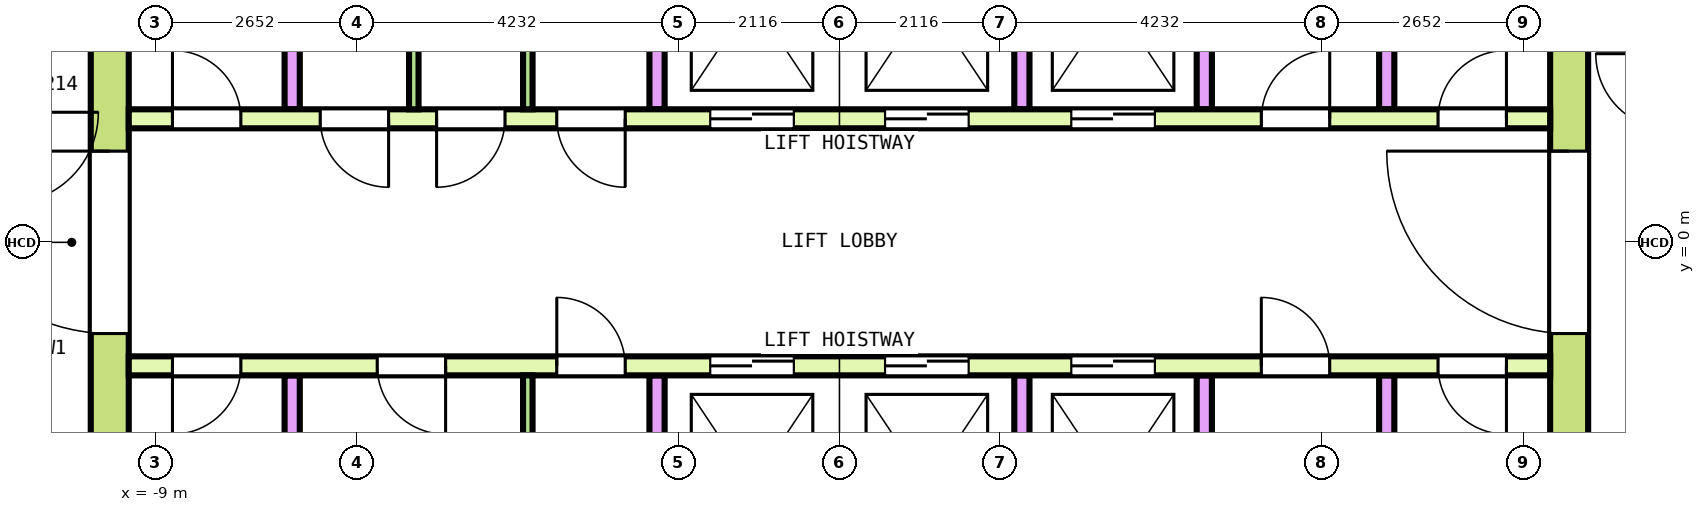
"""IFC4 building model, lengths in metres.
Left out: names, types, materials, properties, quantities, classifications, styles, units other than length and angle.
Written with IfcOpenShell. Run it as: python <this file> out.ifc"""

import sys

from ifc_helpers import new_model, si_unit, direction, frame, frame_2d, origin, place, context, subcontext, project, spatial, rectangle, extrude, element, fill, save


model = new_model("IFC4")
c1 = context("Model", 3, precision=1e-05, world=origin(), true_north=direction((0.0, 1.0)))
c2 = subcontext(c1, "Body", "Model", "MODEL_VIEW")
j1 = project(units=[si_unit("LENGTHUNIT", "METRE"), si_unit("PLANEANGLEUNIT", "RADIAN")], contexts=[c1])
p1 = place(None, origin())
s1 = spatial("IfcSite", under=j1, at=p1, CompositionType="ELEMENT")
p2 = place(p1, origin())
s2 = spatial("IfcBuilding", under=s1, at=p2, CompositionType="ELEMENT")
p3 = place(p2, frame((0.0, 0.0, 287.0)))
s3 = spatial("IfcBuildingStorey", under=s2, at=p3, CompositionType="ELEMENT", Elevation=287.0)
p4 = place(p3, frame((-9.6, -7.85, 0.0), z_axis=(0.0, 0.0, 1.0), x_axis=(0.0, 1.0, 0.0)))
e1 = element("IfcWall", 1, at=p4, inside=s3, PredefinedType="SHEAR", context=c2, shape_type="SweptSolid", body=[
    extrude(rectangle(XDim=15.7, YDim=0.5, at=frame_2d((7.85, 0.0))), origin(), (0.0, 0.0, 1.0), 3.7),
])
p5 = place(p4, frame((6.65, 0.0, 0.0)))
e2 = element("IfcOpeningElement", 2, at=p5, cuts=e1, PredefinedType="OPENING", context=c2, shape_type="SweptSolid", body=[
    extrude(rectangle(XDim=2.4, YDim=2.1, at=frame_2d((1.2, 1.05))), frame((0.0, 0.26, 0.0), z_axis=(0.0, -1.0, 0.0), x_axis=(1.0, 0.0, 0.0)), (0.0, 0.0, 1.0), 0.52),
])
p6 = place(p4, frame((13.55, 0.0, 0.0)))
e3 = element("IfcOpeningElement", 3, at=p6, cuts=e1, PredefinedType="OPENING", context=c2, shape_type="SweptSolid", body=[
    extrude(rectangle(XDim=1.2, YDim=2.1, at=frame_2d((0.6, 1.05))), frame((0.0, 0.26, 0.0), z_axis=(0.0, -1.0, 0.0), x_axis=(1.0, 0.0, 0.0)), (0.0, 0.0, 1.0), 0.52),
])
p7 = place(p4, frame((0.95, 0.0, 0.0)))
e4 = element("IfcOpeningElement", 4, at=p7, cuts=e1, PredefinedType="OPENING", context=c2, shape_type="SweptSolid", body=[
    extrude(rectangle(XDim=1.2, YDim=2.1, at=frame_2d((0.6, 1.05))), frame((0.0, 0.26, 0.0), z_axis=(0.0, -1.0, 0.0), x_axis=(1.0, 0.0, 0.0)), (0.0, 0.0, 1.0), 0.52),
])
p8 = place(p3, frame((9.6, -7.85, 0.0), z_axis=(0.0, 0.0, 1.0), x_axis=(0.0, 1.0, 0.0)))
e5 = element("IfcWall", 5, at=p8, inside=s3, PredefinedType="SHEAR", context=c2, shape_type="SweptSolid", body=[
    extrude(rectangle(XDim=15.7, YDim=0.5, at=frame_2d((7.85, 0.0))), origin(), (0.0, 0.0, 1.0), 3.7),
])
p9 = place(p8, frame((6.65, 0.0, 0.0)))
e6 = element("IfcOpeningElement", 6, at=p9, cuts=e5, PredefinedType="OPENING", context=c2, shape_type="SweptSolid", body=[
    extrude(rectangle(XDim=2.4, YDim=2.1, at=frame_2d((1.2, 1.05))), frame((0.0, 0.26, 0.0), z_axis=(0.0, -1.0, 0.0), x_axis=(1.0, 0.0, 0.0)), (0.0, 0.0, 1.0), 0.52),
])
p10 = place(p8, frame((13.55, 0.0, 0.0)))
e7 = element("IfcOpeningElement", 7, at=p10, cuts=e5, PredefinedType="OPENING", context=c2, shape_type="SweptSolid", body=[
    extrude(rectangle(XDim=1.2, YDim=2.1, at=frame_2d((0.6, 1.05))), frame((0.0, 0.26, 0.0), z_axis=(0.0, -1.0, 0.0), x_axis=(1.0, 0.0, 0.0)), (0.0, 0.0, 1.0), 0.52),
])
p11 = place(p8, frame((1.05, 0.0, 0.0)))
e8 = element("IfcOpeningElement", 8, at=p11, cuts=e5, PredefinedType="OPENING", context=c2, shape_type="SweptSolid", body=[
    extrude(rectangle(XDim=1.0, YDim=2.1, at=frame_2d((0.5, 1.05))), frame((0.0, 0.26, 0.0), z_axis=(0.0, -1.0, 0.0), x_axis=(1.0, 0.0, 0.0)), (0.0, 0.0, 1.0), 0.52),
])
p12 = place(p3, frame((-9.35, 1.625, 0.0), z_axis=(0.0, 0.0, 1.0), x_axis=(1.0, 0.0, 0.0)))
e9 = element("IfcWall", 9, at=p12, inside=s3, PredefinedType="SOLIDWALL", context=c2, shape_type="SweptSolid", body=[
    extrude(rectangle(XDim=18.7, YDim=0.25, at=frame_2d((9.35, 0.0))), origin(), (0.0, 0.0, 1.0), 3.7),
])
p13 = place(p12, frame((7.65, 0.0, 0.0)))
e10 = element("IfcOpeningElement", 10, at=p13, cuts=e9, PredefinedType="OPENING", context=c2, shape_type="SweptSolid", body=[
    extrude(rectangle(XDim=1.1, YDim=2.1, at=frame_2d((0.55, 1.05))), frame((0.0, 0.135, 0.0), z_axis=(0.0, -1.0, 0.0), x_axis=(1.0, 0.0, 0.0)), (0.0, 0.0, 1.0), 0.27),
])
p14 = place(p12, frame((9.95, 0.0, 0.0)))
e11 = element("IfcOpeningElement", 11, at=p14, cuts=e9, PredefinedType="OPENING", context=c2, shape_type="SweptSolid", body=[
    extrude(rectangle(XDim=1.1, YDim=2.1, at=frame_2d((0.55, 1.05))), frame((0.0, 0.135, 0.0), z_axis=(0.0, -1.0, 0.0), x_axis=(1.0, 0.0, 0.0)), (0.0, 0.0, 1.0), 0.27),
])
p15 = place(p12, frame((12.4, 0.0, 0.0)))
e12 = element("IfcOpeningElement", 12, at=p15, cuts=e9, PredefinedType="OPENING", context=c2, shape_type="SweptSolid", body=[
    extrude(rectangle(XDim=1.1, YDim=2.1, at=frame_2d((0.55, 1.05))), frame((0.0, 0.135, 0.0), z_axis=(0.0, -1.0, 0.0), x_axis=(1.0, 0.0, 0.0)), (0.0, 0.0, 1.0), 0.27),
])
p16 = place(p12, frame((0.575, 0.0, 0.0)))
e13 = element("IfcOpeningElement", 13, at=p16, cuts=e9, PredefinedType="OPENING", context=c2, shape_type="SweptSolid", body=[
    extrude(rectangle(XDim=0.9, YDim=2.1, at=frame_2d((0.45, 1.05))), frame((0.0, 0.135, 0.0), z_axis=(0.0, -1.0, 0.0), x_axis=(1.0, 0.0, 0.0)), (0.0, 0.0, 1.0), 0.27),
])
p17 = place(p12, frame((2.519, 0.0, 0.0)))
e14 = element("IfcOpeningElement", 14, at=p17, cuts=e9, PredefinedType="OPENING", context=c2, shape_type="SweptSolid", body=[
    extrude(rectangle(XDim=0.9, YDim=2.1, at=frame_2d((0.45, 1.05))), frame((0.0, 0.135, 0.0), z_axis=(0.0, -1.0, 0.0), x_axis=(1.0, 0.0, 0.0)), (0.0, 0.0, 1.0), 0.27),
])
p18 = place(p12, frame((4.05, 0.0, 0.0)))
e15 = element("IfcOpeningElement", 15, at=p18, cuts=e9, PredefinedType="OPENING", context=c2, shape_type="SweptSolid", body=[
    extrude(rectangle(XDim=0.9, YDim=2.1, at=frame_2d((0.45, 1.05))), frame((0.0, 0.135, 0.0), z_axis=(0.0, -1.0, 0.0), x_axis=(1.0, 0.0, 0.0)), (0.0, 0.0, 1.0), 0.27),
])
p19 = place(p12, frame((5.631, 0.0, 0.0)))
e16 = element("IfcOpeningElement", 16, at=p19, cuts=e9, PredefinedType="OPENING", context=c2, shape_type="SweptSolid", body=[
    extrude(rectangle(XDim=0.9, YDim=2.1, at=frame_2d((0.45, 1.05))), frame((0.0, 0.135, 0.0), z_axis=(0.0, -1.0, 0.0), x_axis=(1.0, 0.0, 0.0)), (0.0, 0.0, 1.0), 0.27),
])
p20 = place(p12, frame((14.9, 0.0, 0.0)))
e17 = element("IfcOpeningElement", 17, at=p20, cuts=e9, PredefinedType="OPENING", context=c2, shape_type="SweptSolid", body=[
    extrude(rectangle(XDim=0.9, YDim=2.1, at=frame_2d((0.45, 1.05))), frame((0.0, 0.135, 0.0), z_axis=(0.0, -1.0, 0.0), x_axis=(1.0, 0.0, 0.0)), (0.0, 0.0, 1.0), 0.27),
])
p21 = place(p12, frame((17.225, 0.0, 0.0)))
e18 = element("IfcOpeningElement", 18, at=p21, cuts=e9, PredefinedType="OPENING", context=c2, shape_type="SweptSolid", body=[
    extrude(rectangle(XDim=0.9, YDim=2.1, at=frame_2d((0.45, 1.05))), frame((0.0, 0.135, 0.0), z_axis=(0.0, -1.0, 0.0), x_axis=(1.0, 0.0, 0.0)), (0.0, 0.0, 1.0), 0.27),
])
for number, where, z_axis, x_axis in (
    (19, (-7.2, 1.75, 0.0), (0.0, 0.0, 1.0), (0.0, 1.0, 0.0)),
    (20, (-2.4, 1.75, 0.0), (0.0, 0.0, 1.0), (0.0, 1.0, 0.0)),
    (21, (2.4, 1.75, 0.0), (0.0, 0.0, 1.0), (0.0, 1.0, 0.0)),
    (22, (4.8, 1.75, 0.0), (0.0, 0.0, 1.0), (0.0, 1.0, 0.0)),
    (23, (7.2, 1.75, 0.0), (0.0, 0.0, 1.0), (0.0, 1.0, 0.0)),
):
    element("IfcWall", number, at=place(p3, frame(where, z_axis=z_axis, x_axis=x_axis)), inside=s3, PredefinedType="SOLIDWALL", context=c2, shape_type="SweptSolid", body=[
        extrude(rectangle(XDim=2.9, YDim=0.2, at=frame_2d((1.45, 0.0))), origin(), (0.0, 0.0, 1.0), 3.7),
    ])
p22 = place(p3, frame((-9.35, -1.625, 0.0), z_axis=(0.0, 0.0, 1.0), x_axis=(1.0, 0.0, 0.0)))
e24 = element("IfcWall", 24, at=p22, inside=s3, PredefinedType="SOLIDWALL", context=c2, shape_type="SweptSolid", body=[
    extrude(rectangle(XDim=18.7, YDim=0.25, at=frame_2d((9.35, 0.0))), origin(), (0.0, 0.0, 1.0), 3.7),
])
p23 = place(p22, frame((7.65, 0.0, 0.0)))
e25 = element("IfcOpeningElement", 25, at=p23, cuts=e24, PredefinedType="OPENING", context=c2, shape_type="SweptSolid", body=[
    extrude(rectangle(XDim=1.1, YDim=2.1, at=frame_2d((0.55, 1.05))), frame((0.0, 0.135, 0.0), z_axis=(0.0, -1.0, 0.0), x_axis=(1.0, 0.0, 0.0)), (0.0, 0.0, 1.0), 0.27),
])
p24 = place(p22, frame((9.95, 0.0, 0.0)))
e26 = element("IfcOpeningElement", 26, at=p24, cuts=e24, PredefinedType="OPENING", context=c2, shape_type="SweptSolid", body=[
    extrude(rectangle(XDim=1.1, YDim=2.1, at=frame_2d((0.55, 1.05))), frame((0.0, 0.135, 0.0), z_axis=(0.0, -1.0, 0.0), x_axis=(1.0, 0.0, 0.0)), (0.0, 0.0, 1.0), 0.27),
])
p25 = place(p22, frame((12.4, 0.0, 0.0)))
e27 = element("IfcOpeningElement", 27, at=p25, cuts=e24, PredefinedType="OPENING", context=c2, shape_type="SweptSolid", body=[
    extrude(rectangle(XDim=1.1, YDim=2.1, at=frame_2d((0.55, 1.05))), frame((0.0, 0.135, 0.0), z_axis=(0.0, -1.0, 0.0), x_axis=(1.0, 0.0, 0.0)), (0.0, 0.0, 1.0), 0.27),
])
p26 = place(p22, frame((0.575, 0.0, 0.0)))
e28 = element("IfcOpeningElement", 28, at=p26, cuts=e24, PredefinedType="OPENING", context=c2, shape_type="SweptSolid", body=[
    extrude(rectangle(XDim=0.9, YDim=2.1, at=frame_2d((0.45, 1.05))), frame((0.0, 0.135, 0.0), z_axis=(0.0, -1.0, 0.0), x_axis=(1.0, 0.0, 0.0)), (0.0, 0.0, 1.0), 0.27),
])
p27 = place(p22, frame((3.269, 0.0, 0.0)))
e29 = element("IfcOpeningElement", 29, at=p27, cuts=e24, PredefinedType="OPENING", context=c2, shape_type="SweptSolid", body=[
    extrude(rectangle(XDim=0.9, YDim=2.1, at=frame_2d((0.45, 1.05))), frame((0.0, 0.135, 0.0), z_axis=(0.0, -1.0, 0.0), x_axis=(1.0, 0.0, 0.0)), (0.0, 0.0, 1.0), 0.27),
])
p28 = place(p22, frame((5.631, 0.0, 0.0)))
e30 = element("IfcOpeningElement", 30, at=p28, cuts=e24, PredefinedType="OPENING", context=c2, shape_type="SweptSolid", body=[
    extrude(rectangle(XDim=0.9, YDim=2.1, at=frame_2d((0.45, 1.05))), frame((0.0, 0.135, 0.0), z_axis=(0.0, -1.0, 0.0), x_axis=(1.0, 0.0, 0.0)), (0.0, 0.0, 1.0), 0.27),
])
p29 = place(p22, frame((14.9, 0.0, 0.0)))
e31 = element("IfcOpeningElement", 31, at=p29, cuts=e24, PredefinedType="OPENING", context=c2, shape_type="SweptSolid", body=[
    extrude(rectangle(XDim=0.9, YDim=2.1, at=frame_2d((0.45, 1.05))), frame((0.0, 0.135, 0.0), z_axis=(0.0, -1.0, 0.0), x_axis=(1.0, 0.0, 0.0)), (0.0, 0.0, 1.0), 0.27),
])
p30 = place(p22, frame((17.225, 0.0, 0.0)))
e32 = element("IfcOpeningElement", 32, at=p30, cuts=e24, PredefinedType="OPENING", context=c2, shape_type="SweptSolid", body=[
    extrude(rectangle(XDim=0.9, YDim=2.1, at=frame_2d((0.45, 1.05))), frame((0.0, 0.135, 0.0), z_axis=(0.0, -1.0, 0.0), x_axis=(1.0, 0.0, 0.0)), (0.0, 0.0, 1.0), 0.27),
])
for number, where, z_axis, x_axis in (
    (33, (-7.2, -4.65, 0.0), (0.0, 0.0, 1.0), (0.0, 1.0, 0.0)),
    (34, (-2.4, -4.65, 0.0), (0.0, 0.0, 1.0), (0.0, 1.0, 0.0)),
    (35, (2.4, -4.65, 0.0), (0.0, 0.0, 1.0), (0.0, 1.0, 0.0)),
    (36, (4.8, -4.65, 0.0), (0.0, 0.0, 1.0), (0.0, 1.0, 0.0)),
    (37, (7.2, -4.65, 0.0), (0.0, 0.0, 1.0), (0.0, 1.0, 0.0)),
):
    element("IfcWall", number, at=place(p3, frame(where, z_axis=z_axis, x_axis=x_axis)), inside=s3, PredefinedType="SOLIDWALL", context=c2, shape_type="SweptSolid", body=[
        extrude(rectangle(XDim=2.9, YDim=0.2, at=frame_2d((1.45, 0.0))), origin(), (0.0, 0.0, 1.0), 3.7),
    ])
for number, where, z_axis, x_axis in (
    (38, (-5.6, 1.75, 0.0), (0.0, 0.0, 1.0), (0.0, 1.0, 0.0)),
    (39, (-4.1, 1.75, 0.0), (0.0, 0.0, 1.0), (0.0, 1.0, 0.0)),
    (40, (-4.1, -4.65, 0.0), (0.0, 0.0, 1.0), (0.0, 1.0, 0.0)),
):
    element("IfcWall", number, at=place(p3, frame(where, z_axis=z_axis, x_axis=x_axis)), inside=s3, PredefinedType="PARTITIONING", context=c2, shape_type="SweptSolid", body=[
        extrude(rectangle(XDim=2.9, YDim=0.125, at=frame_2d((1.45, 0.0))), origin(), (0.0, 0.0, 1.0), 3.7),
    ])
p31 = place(p13, origin())
e41 = element("IfcDoor", 41, at=p31, inside=s3, OperationType="DOUBLE_DOOR_SLIDING", PredefinedType="DOOR", context=c2, shape_type="SweptSolid", body=[
    extrude(rectangle(XDim=1.1, YDim=2.1, at=frame_2d((0.55, 1.05))), frame((0.0, 0.075, 0.0), z_axis=(0.0, -1.0, 0.0), x_axis=(1.0, 0.0, 0.0)), (0.0, 0.0, 1.0), 0.15),
])
fill(e10, e41)
p32 = place(p14, origin())
e42 = element("IfcDoor", 42, at=p32, inside=s3, OperationType="DOUBLE_DOOR_SLIDING", PredefinedType="DOOR", context=c2, shape_type="SweptSolid", body=[
    extrude(rectangle(XDim=1.1, YDim=2.1, at=frame_2d((0.55, 1.05))), frame((0.0, 0.075, 0.0), z_axis=(0.0, -1.0, 0.0), x_axis=(1.0, 0.0, 0.0)), (0.0, 0.0, 1.0), 0.15),
])
fill(e11, e42)
p33 = place(p15, origin())
e43 = element("IfcDoor", 43, at=p33, inside=s3, OperationType="DOUBLE_DOOR_SLIDING", PredefinedType="DOOR", context=c2, shape_type="SweptSolid", body=[
    extrude(rectangle(XDim=1.1, YDim=2.1, at=frame_2d((0.55, 1.05))), frame((0.0, 0.075, 0.0), z_axis=(0.0, -1.0, 0.0), x_axis=(1.0, 0.0, 0.0)), (0.0, 0.0, 1.0), 0.15),
])
fill(e12, e43)
p34 = place(p23, origin())
e44 = element("IfcDoor", 44, at=p34, inside=s3, OperationType="DOUBLE_DOOR_SLIDING", PredefinedType="DOOR", context=c2, shape_type="SweptSolid", body=[
    extrude(rectangle(XDim=1.1, YDim=2.1, at=frame_2d((0.55, 1.05))), frame((0.0, 0.075, 0.0), z_axis=(0.0, -1.0, 0.0), x_axis=(1.0, 0.0, 0.0)), (0.0, 0.0, 1.0), 0.15),
])
fill(e25, e44)
p35 = place(p24, origin())
e45 = element("IfcDoor", 45, at=p35, inside=s3, OperationType="DOUBLE_DOOR_SLIDING", PredefinedType="DOOR", context=c2, shape_type="SweptSolid", body=[
    extrude(rectangle(XDim=1.1, YDim=2.1, at=frame_2d((0.55, 1.05))), frame((0.0, 0.075, 0.0), z_axis=(0.0, -1.0, 0.0), x_axis=(1.0, 0.0, 0.0)), (0.0, 0.0, 1.0), 0.15),
])
fill(e26, e45)
p36 = place(p25, origin())
e46 = element("IfcDoor", 46, at=p36, inside=s3, OperationType="DOUBLE_DOOR_SLIDING", PredefinedType="DOOR", context=c2, shape_type="SweptSolid", body=[
    extrude(rectangle(XDim=1.1, YDim=2.1, at=frame_2d((0.55, 1.05))), frame((0.0, 0.075, 0.0), z_axis=(0.0, -1.0, 0.0), x_axis=(1.0, 0.0, 0.0)), (0.0, 0.0, 1.0), 0.15),
])
fill(e27, e46)
p37 = place(p5, origin())
e47 = element("IfcDoor", 47, at=p37, inside=s3, OperationType="DOUBLE_DOOR_SINGLE_SWING", PredefinedType="DOOR", context=c2, shape_type="SweptSolid", body=[
    extrude(rectangle(XDim=2.4, YDim=2.1, at=frame_2d((1.2, 1.05))), frame((0.0, 0.2, 0.0), z_axis=(0.0, -1.0, 0.0), x_axis=(1.0, 0.0, 0.0)), (0.0, 0.0, 1.0), 0.4),
])
fill(e2, e47)
p38 = place(p9, origin())
e48 = element("IfcDoor", 48, at=p38, inside=s3, OperationType="DOUBLE_DOOR_SINGLE_SWING", PredefinedType="DOOR", context=c2, shape_type="SweptSolid", body=[
    extrude(rectangle(XDim=2.4, YDim=2.1, at=frame_2d((1.2, 1.05))), frame((0.0, 0.2, 0.0), z_axis=(0.0, -1.0, 0.0), x_axis=(1.0, 0.0, 0.0)), (0.0, 0.0, 1.0), 0.4),
])
fill(e6, e48)
p39 = place(p16, origin())
e49 = element("IfcDoor", 49, at=p39, inside=s3, OperationType="SINGLE_SWING_RIGHT", PredefinedType="DOOR", context=c2, shape_type="SweptSolid", body=[
    extrude(rectangle(XDim=0.9, YDim=2.1, at=frame_2d((0.45, 1.05))), frame((0.0, 0.075, 0.0), z_axis=(0.0, -1.0, 0.0), x_axis=(1.0, 0.0, 0.0)), (0.0, 0.0, 1.0), 0.15),
])
fill(e13, e49)
p40 = place(p17, origin())
e50 = element("IfcDoor", 50, at=p40, inside=s3, OperationType="SINGLE_SWING_LEFT", PredefinedType="DOOR", context=c2, shape_type="SweptSolid", body=[
    extrude(rectangle(XDim=0.9, YDim=2.1, at=frame_2d((0.45, 1.05))), frame((0.0, 0.075, 0.0), z_axis=(0.0, -1.0, 0.0), x_axis=(1.0, 0.0, 0.0)), (0.0, 0.0, 1.0), 0.15),
])
fill(e14, e50)
p41 = place(p18, origin())
e51 = element("IfcDoor", 51, at=p41, inside=s3, OperationType="SINGLE_SWING_RIGHT", PredefinedType="DOOR", context=c2, shape_type="SweptSolid", body=[
    extrude(rectangle(XDim=0.9, YDim=2.1, at=frame_2d((0.45, 1.05))), frame((0.0, 0.075, 0.0), z_axis=(0.0, -1.0, 0.0), x_axis=(1.0, 0.0, 0.0)), (0.0, 0.0, 1.0), 0.15),
])
fill(e15, e51)
p42 = place(p19, origin())
e52 = element("IfcDoor", 52, at=p42, inside=s3, OperationType="SINGLE_SWING_LEFT", PredefinedType="DOOR", context=c2, shape_type="SweptSolid", body=[
    extrude(rectangle(XDim=0.9, YDim=2.1, at=frame_2d((0.45, 1.05))), frame((0.0, 0.075, 0.0), z_axis=(0.0, -1.0, 0.0), x_axis=(1.0, 0.0, 0.0)), (0.0, 0.0, 1.0), 0.15),
])
fill(e16, e52)
p43 = place(p20, origin())
e53 = element("IfcDoor", 53, at=p43, inside=s3, OperationType="SINGLE_SWING_RIGHT", PredefinedType="DOOR", context=c2, shape_type="SweptSolid", body=[
    extrude(rectangle(XDim=0.9, YDim=2.1, at=frame_2d((0.45, 1.05))), frame((0.0, 0.075, 0.0), z_axis=(0.0, -1.0, 0.0), x_axis=(1.0, 0.0, 0.0)), (0.0, 0.0, 1.0), 0.15),
])
fill(e17, e53)
p44 = place(p21, origin())
e54 = element("IfcDoor", 54, at=p44, inside=s3, OperationType="SINGLE_SWING_LEFT", PredefinedType="DOOR", context=c2, shape_type="SweptSolid", body=[
    extrude(rectangle(XDim=0.9, YDim=2.1, at=frame_2d((0.45, 1.05))), frame((0.0, 0.075, 0.0), z_axis=(0.0, -1.0, 0.0), x_axis=(1.0, 0.0, 0.0)), (0.0, 0.0, 1.0), 0.15),
])
fill(e18, e54)
p45 = place(p26, origin())
e55 = element("IfcDoor", 55, at=p45, inside=s3, OperationType="SINGLE_SWING_RIGHT", PredefinedType="DOOR", context=c2, shape_type="SweptSolid", body=[
    extrude(rectangle(XDim=0.9, YDim=2.1, at=frame_2d((0.45, 1.05))), frame((0.0, 0.075, 0.0), z_axis=(0.0, -1.0, 0.0), x_axis=(1.0, 0.0, 0.0)), (0.0, 0.0, 1.0), 0.15),
])
fill(e28, e55)
p46 = place(p27, origin())
e56 = element("IfcDoor", 56, at=p46, inside=s3, OperationType="SINGLE_SWING_LEFT", PredefinedType="DOOR", context=c2, shape_type="SweptSolid", body=[
    extrude(rectangle(XDim=0.9, YDim=2.1, at=frame_2d((0.45, 1.05))), frame((0.0, 0.075, 0.0), z_axis=(0.0, -1.0, 0.0), x_axis=(1.0, 0.0, 0.0)), (0.0, 0.0, 1.0), 0.15),
])
fill(e29, e56)
p47 = place(p28, origin())
e57 = element("IfcDoor", 57, at=p47, inside=s3, OperationType="SINGLE_SWING_RIGHT", PredefinedType="DOOR", context=c2, shape_type="SweptSolid", body=[
    extrude(rectangle(XDim=0.9, YDim=2.1, at=frame_2d((0.45, 1.05))), frame((0.0, 0.075, 0.0), z_axis=(0.0, -1.0, 0.0), x_axis=(1.0, 0.0, 0.0)), (0.0, 0.0, 1.0), 0.15),
])
fill(e30, e57)
p48 = place(p29, origin())
e58 = element("IfcDoor", 58, at=p48, inside=s3, OperationType="SINGLE_SWING_LEFT", PredefinedType="DOOR", context=c2, shape_type="SweptSolid", body=[
    extrude(rectangle(XDim=0.9, YDim=2.1, at=frame_2d((0.45, 1.05))), frame((0.0, 0.075, 0.0), z_axis=(0.0, -1.0, 0.0), x_axis=(1.0, 0.0, 0.0)), (0.0, 0.0, 1.0), 0.15),
])
fill(e31, e58)
p49 = place(p30, origin())
e59 = element("IfcDoor", 59, at=p49, inside=s3, OperationType="SINGLE_SWING_RIGHT", PredefinedType="DOOR", context=c2, shape_type="SweptSolid", body=[
    extrude(rectangle(XDim=0.9, YDim=2.1, at=frame_2d((0.45, 1.05))), frame((0.0, 0.075, 0.0), z_axis=(0.0, -1.0, 0.0), x_axis=(1.0, 0.0, 0.0)), (0.0, 0.0, 1.0), 0.15),
])
fill(e32, e59)
save(model, sys.argv[1])
